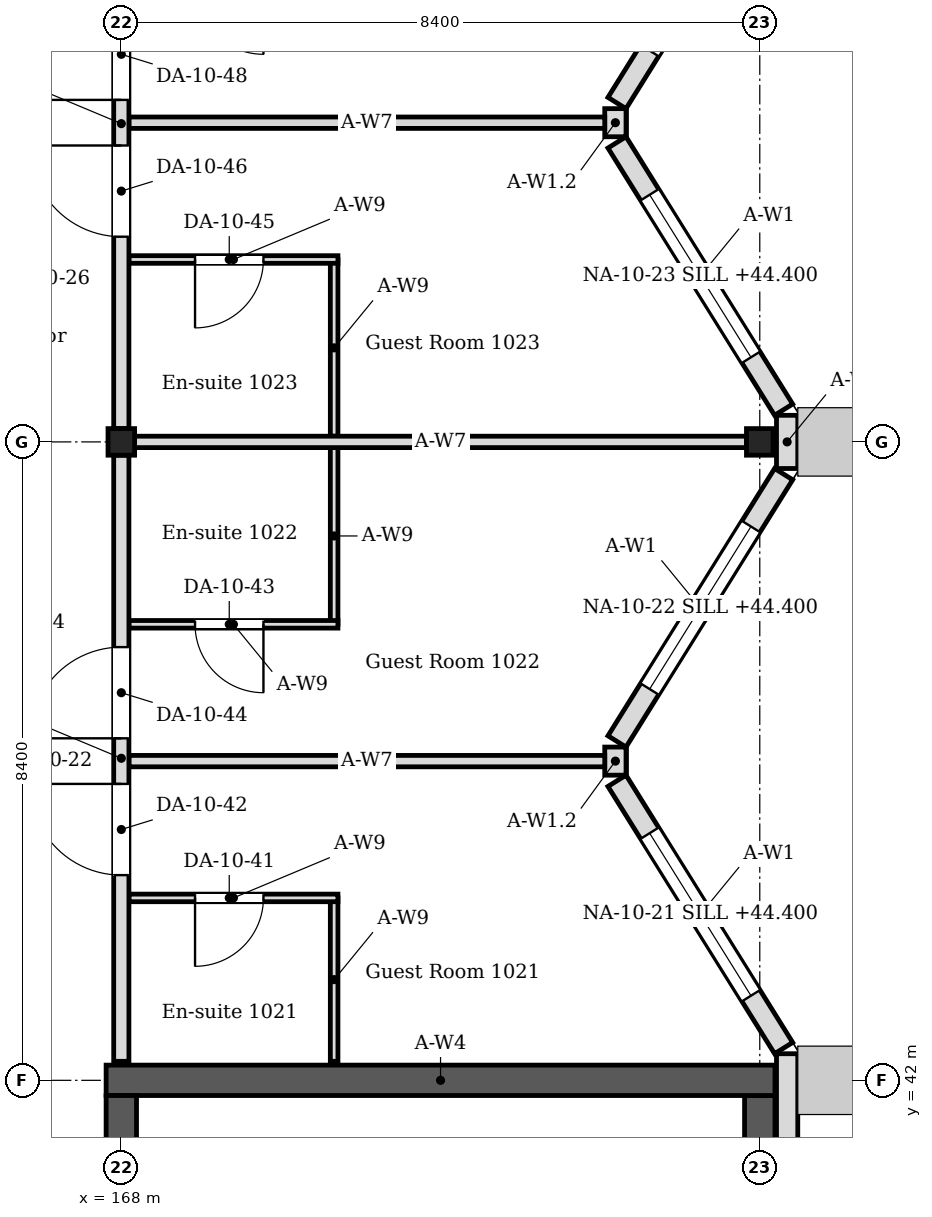
"""IFC4 building model, lengths in metres.
Left out: names, types, materials, properties, quantities, classifications, styles, units other than length and angle.
Written with IfcOpenShell. Run it as: python <this file> out.ifc"""

import sys

from ifc_helpers import new_model, si_unit, direction, frame, frame_2d, origin, origin_2d, place, context, subcontext, project, spatial, rectangle, i_section, extrude, element, fill, save


model = new_model("IFC4")
c1 = context("Model", 3, precision=1e-05, world=origin(), true_north=direction((0.0, 1.0)))
c2 = subcontext(c1, "Body", "Model", "MODEL_VIEW")
j1 = project(units=[si_unit("LENGTHUNIT", "METRE"), si_unit("PLANEANGLEUNIT", "RADIAN")], contexts=[c1])
p1 = place(None, origin())
s1 = spatial("IfcSite", under=j1, at=p1, CompositionType="ELEMENT")
p2 = place(p1, origin())
s2 = spatial("IfcBuilding", under=s1, at=p2, CompositionType="ELEMENT")
p3 = place(p2, frame((0.0, 0.0, 43.8)))
s3 = spatial("IfcBuildingStorey", under=s2, at=p3, CompositionType="ELEMENT", Elevation=43.8)
for number, where, z_axis, x_axis in (
    (1, (168.0, 50.4, 0.0), (0.0, 0.0, 1.0), (1.0, 0.0, 0.0)),
    (2, (176.4, 50.4, 0.0), (0.0, 0.0, 1.0), (1.0, 0.0, 0.0)),
):
    element("IfcColumn", number, at=place(p3, frame(where, z_axis=z_axis, x_axis=x_axis)), inside=s3, PredefinedType="COLUMN", context=c2, shape_type="SweptSolid", body=[
        extrude(i_section(OverallWidth=0.35, OverallDepth=0.35, WebThickness=0.012, FlangeThickness=0.019, FilletRadius=0.013, at=origin_2d()), origin(), (0.0, 0.0, 1.0), 4.2),
    ])
p4 = place(p3, frame((167.8, 42.0, 0.0), z_axis=(0.0, 0.0, 1.0), x_axis=(1.0, 0.0, 0.0)))
e3 = element("IfcWall", 3, at=p4, inside=s3, PredefinedType="SOLIDWALL", context=c2, shape_type="SweptSolid", body=[
    extrude(rectangle(XDim=8.8, YDim=0.4, at=frame_2d((4.4, 0.0))), origin(), (0.0, 0.0, 1.0), 4.05),
])
p5 = place(p3, frame((168.0, 25.4, 0.0), z_axis=(0.0, 0.0, 1.0), x_axis=(0.0, 1.0, 0.0)))
e4 = element("IfcWall", 4, at=p5, inside=s3, PredefinedType="SOLIDWALL", context=c2, shape_type="SweptSolid", body=[
    extrude(rectangle(XDim=16.4, YDim=0.4, at=frame_2d((8.2, 0.0))), origin(), (0.0, 0.0, 1.0), 4.05),
])
p6 = place(p5, frame((1.0, 0.0, 0.0)))
e5 = element("IfcOpeningElement", 5, at=p6, cuts=e4, PredefinedType="OPENING", context=c2, shape_type="SweptSolid", body=[
    extrude(rectangle(XDim=1.0, YDim=2.1, at=frame_2d((0.5, 1.05))), frame((0.0, 0.21, 0.0), z_axis=(0.0, -1.0, 0.0), x_axis=(1.0, 0.0, 0.0)), (0.0, 0.0, 1.0), 0.42),
])
p7 = place(p5, frame((14.4, 0.0, 0.0)))
e6 = element("IfcOpeningElement", 6, at=p7, cuts=e4, PredefinedType="OPENING", context=c2, shape_type="SweptSolid", body=[
    extrude(rectangle(XDim=1.4, YDim=2.1, at=frame_2d((0.7, 1.05))), frame((0.0, 0.21, 0.0), z_axis=(0.0, -1.0, 0.0), x_axis=(1.0, 0.0, 0.0)), (0.0, 0.0, 1.0), 0.42),
])
p8 = place(p3, frame((176.4, 25.4, 0.0), z_axis=(0.0, 0.0, 1.0), x_axis=(0.0, 1.0, 0.0)))
e7 = element("IfcWall", 7, at=p8, inside=s3, PredefinedType="SOLIDWALL", context=c2, shape_type="SweptSolid", body=[
    extrude(rectangle(XDim=16.4, YDim=0.4, at=frame_2d((8.2, 0.0))), origin(), (0.0, 0.0, 1.0), 4.05),
])
p9 = place(p3, frame((176.76, -0.22, 0.0), z_axis=(0.0, 0.0, 1.0), x_axis=(0.0, 1.0, 0.0)))
e8 = element("IfcWall", 8, at=p9, inside=s3, PredefinedType="SOLIDWALL", context=c2, shape_type="SweptSolid", body=[
    extrude(rectangle(XDim=42.57, YDim=0.28, at=frame_2d((21.285, 0.0))), origin(), (0.0, 0.0, 1.0), 4.05),
])
p10 = place(p9, frame((9.88, 0.0, 0.6)))
e9 = element("IfcOpeningElement", 9, at=p10, cuts=e8, PredefinedType="OPENING", context=c2, shape_type="SweptSolid", body=[
    extrude(rectangle(XDim=2.52, YDim=2.4, at=frame_2d((1.26, 1.2))), frame((0.0, 0.15, 0.0), z_axis=(0.0, -1.0, 0.0), x_axis=(1.0, 0.0, 0.0)), (0.0, 0.0, 1.0), 0.3),
])
p11 = place(p9, frame((14.08, 0.0, 0.6)))
e10 = element("IfcOpeningElement", 10, at=p11, cuts=e8, PredefinedType="OPENING", context=c2, shape_type="SweptSolid", body=[
    extrude(rectangle(XDim=2.52, YDim=2.4, at=frame_2d((1.26, 1.2))), frame((0.0, 0.15, 0.0), z_axis=(0.0, -1.0, 0.0), x_axis=(1.0, 0.0, 0.0)), (0.0, 0.0, 1.0), 0.3),
])
p12 = place(p9, frame((17.86, 0.0, 0.6)))
e11 = element("IfcOpeningElement", 11, at=p12, cuts=e8, PredefinedType="OPENING", context=c2, shape_type="SweptSolid", body=[
    extrude(rectangle(XDim=2.52, YDim=2.4, at=frame_2d((1.26, 1.2))), frame((0.0, 0.15, 0.0), z_axis=(0.0, -1.0, 0.0), x_axis=(1.0, 0.0, 0.0)), (0.0, 0.0, 1.0), 0.3),
])
p13 = place(p9, frame((22.06, 0.0, 0.45)))
e12 = element("IfcOpeningElement", 12, at=p13, cuts=e8, PredefinedType="OPENING", context=c2, shape_type="SweptSolid", body=[
    extrude(rectangle(XDim=2.52, YDim=2.1, at=frame_2d((1.26, 1.05))), frame((0.0, 0.15, 0.0), z_axis=(0.0, -1.0, 0.0), x_axis=(1.0, 0.0, 0.0)), (0.0, 0.0, 1.0), 0.3),
])
p14 = place(p3, frame((176.714, 42.424, 0.0), z_axis=(0.0, 0.0, 1.0), x_axis=(-0.529018946142, 0.848610013271, 0.0)))
e13 = element("IfcWall", 13, at=p14, inside=s3, PredefinedType="SOLIDWALL", context=c2, shape_type="SweptSolid", body=[
    extrude(rectangle(XDim=4.144, YDim=0.28, at=frame_2d((2.072, 0.0))), origin(), (0.0, 0.0, 1.0), 4.05),
])
p15 = place(p14, frame((0.812, 0.0, 0.6)))
e14 = element("IfcOpeningElement", 14, at=p15, cuts=e13, PredefinedType="OPENING", context=c2, shape_type="SweptSolid", body=[
    extrude(rectangle(XDim=2.52, YDim=2.4, at=frame_2d((1.26, 1.2))), frame((0.0, 0.15, 0.0), z_axis=(0.0, -1.0, 0.0), x_axis=(1.0, 0.0, 0.0)), (0.0, 0.0, 1.0), 0.3),
])
p16 = place(p3, frame((174.521, 46.459, 0.0), z_axis=(0.0, 0.0, 1.0), x_axis=(0.529018946142, 0.848610013271, 0.0)))
e15 = element("IfcWall", 15, at=p16, inside=s3, PredefinedType="SOLIDWALL", context=c2, shape_type="SweptSolid", body=[
    extrude(rectangle(XDim=4.144, YDim=0.28, at=frame_2d((2.072, 0.0))), origin(), (0.0, 0.0, 1.0), 4.05),
])
p17 = place(p16, frame((0.812, 0.0, 0.6)))
e16 = element("IfcOpeningElement", 16, at=p17, cuts=e15, PredefinedType="OPENING", context=c2, shape_type="SweptSolid", body=[
    extrude(rectangle(XDim=2.52, YDim=2.4, at=frame_2d((1.26, 1.2))), frame((0.0, 0.15, 0.0), z_axis=(0.0, -1.0, 0.0), x_axis=(1.0, 0.0, 0.0)), (0.0, 0.0, 1.0), 0.3),
])
p18 = place(p3, frame((174.5, 46.015, 0.0), z_axis=(0.0, 0.0, 1.0), x_axis=(0.0, 1.0, 0.0)))
e17 = element("IfcWall", 17, at=p18, inside=s3, PredefinedType="SOLIDWALL", context=c2, shape_type="SweptSolid", body=[
    extrude(rectangle(XDim=0.37, YDim=0.28, at=frame_2d((0.185, 0.0))), origin(), (0.0, 0.0, 1.0), 3.604),
])
p19 = place(p3, frame((176.76, 50.05, 0.0), z_axis=(0.0, 0.0, 1.0), x_axis=(0.0, 1.0, 0.0)))
e18 = element("IfcWall", 18, at=p19, inside=s3, PredefinedType="SOLIDWALL", context=c2, shape_type="SweptSolid", body=[
    extrude(rectangle(XDim=0.7, YDim=0.28, at=frame_2d((0.35, 0.0))), origin(), (0.0, 0.0, 1.0), 4.05),
])
p20 = place(p3, frame((176.714, 50.824, 0.0), z_axis=(0.0, 0.0, 1.0), x_axis=(-0.529018946142, 0.848610013271, 0.0)))
e19 = element("IfcWall", 19, at=p20, inside=s3, PredefinedType="SOLIDWALL", context=c2, shape_type="SweptSolid", body=[
    extrude(rectangle(XDim=4.144, YDim=0.28, at=frame_2d((2.072, 0.0))), origin(), (0.0, 0.0, 1.0), 4.05),
])
p21 = place(p20, frame((0.812, 0.0, 0.6)))
e20 = element("IfcOpeningElement", 20, at=p21, cuts=e19, PredefinedType="OPENING", context=c2, shape_type="SweptSolid", body=[
    extrude(rectangle(XDim=2.52, YDim=2.4, at=frame_2d((1.26, 1.2))), frame((0.0, 0.15, 0.0), z_axis=(0.0, -1.0, 0.0), x_axis=(1.0, 0.0, 0.0)), (0.0, 0.0, 1.0), 0.3),
])
p22 = place(p3, frame((174.521, 54.859, 0.0), z_axis=(0.0, 0.0, 1.0), x_axis=(0.528992500338, 0.848626498871, 0.0)))
e21 = element("IfcWall", 21, at=p22, inside=s3, PredefinedType="SOLIDWALL", context=c2, shape_type="SweptSolid", body=[
    extrude(rectangle(XDim=4.145, YDim=0.28, at=frame_2d((2.072, 0.0))), origin(), (0.0, 0.0, 1.0), 4.05),
])
p23 = place(p22, frame((0.812, 0.0, 0.6)))
e22 = element("IfcOpeningElement", 22, at=p23, cuts=e21, PredefinedType="OPENING", context=c2, shape_type="SweptSolid", body=[
    extrude(rectangle(XDim=2.52, YDim=2.4, at=frame_2d((1.26, 1.2))), frame((0.0, 0.15, 0.0), z_axis=(0.0, -1.0, 0.0), x_axis=(1.0, 0.0, 0.0)), (0.0, 0.0, 1.0), 0.3),
])
p24 = place(p3, frame((174.5, 54.415, 0.0), z_axis=(0.0, 0.0, 1.0), x_axis=(0.0, 1.0, 0.0)))
e23 = element("IfcWall", 23, at=p24, inside=s3, PredefinedType="SOLIDWALL", context=c2, shape_type="SweptSolid", body=[
    extrude(rectangle(XDim=0.37, YDim=0.28, at=frame_2d((0.185, 0.0))), origin(), (0.0, 0.0, 1.0), 3.604),
])
p25 = place(p3, frame((170.8, 42.25, 0.0), z_axis=(0.0, 0.0, 1.0), x_axis=(0.0, 1.0, 0.0)))
e24 = element("IfcWall", 24, at=p25, inside=s3, PredefinedType="PARTITIONING", context=c2, shape_type="SweptSolid", body=[
    extrude(rectangle(XDim=2.15, YDim=0.1, at=frame_2d((1.075, 0.0))), origin(), (0.0, 0.0, 1.0), 4.05),
])
p26 = place(p3, frame((170.85, 44.4, 0.0), z_axis=(0.0, 0.0, 1.0), x_axis=(-1.0, 0.0, 0.0)))
e25 = element("IfcWall", 25, at=p26, inside=s3, PredefinedType="PARTITIONING", context=c2, shape_type="SweptSolid", body=[
    extrude(rectangle(XDim=2.75, YDim=0.1, at=frame_2d((1.375, 0.0))), origin(), (0.0, 0.0, 1.0), 4.05),
])
p27 = place(p26, frame((0.98, 0.0, 0.0)))
e26 = element("IfcOpeningElement", 26, at=p27, cuts=e25, PredefinedType="OPENING", context=c2, shape_type="SweptSolid", body=[
    extrude(rectangle(XDim=0.9, YDim=2.1, at=frame_2d((0.45, 1.05))), frame((0.0, 0.06, 0.0), z_axis=(0.0, -1.0, 0.0), x_axis=(1.0, 0.0, 0.0)), (0.0, 0.0, 1.0), 0.12),
])
p28 = place(p3, frame((170.8, 48.0, 0.0), z_axis=(0.0, 0.0, 1.0), x_axis=(0.0, 1.0, 0.0)))
e27 = element("IfcWall", 27, at=p28, inside=s3, PredefinedType="PARTITIONING", context=c2, shape_type="SweptSolid", body=[
    extrude(rectangle(XDim=2.325, YDim=0.1, at=frame_2d((1.163, 0.0))), origin(), (0.0, 0.0, 1.0), 4.05),
])
p29 = place(p3, frame((170.85, 48.0, 0.0), z_axis=(0.0, 0.0, 1.0), x_axis=(-1.0, 0.0, 0.0)))
e28 = element("IfcWall", 28, at=p29, inside=s3, PredefinedType="PARTITIONING", context=c2, shape_type="SweptSolid", body=[
    extrude(rectangle(XDim=2.75, YDim=0.1, at=frame_2d((1.375, 0.0))), origin(), (0.0, 0.0, 1.0), 4.05),
])
p30 = place(p29, frame((0.98, 0.0, 0.0)))
e29 = element("IfcOpeningElement", 29, at=p30, cuts=e28, PredefinedType="OPENING", context=c2, shape_type="SweptSolid", body=[
    extrude(rectangle(XDim=0.9, YDim=2.1, at=frame_2d((0.45, 1.05))), frame((0.0, 0.06, 0.0), z_axis=(0.0, -1.0, 0.0), x_axis=(1.0, 0.0, 0.0)), (0.0, 0.0, 1.0), 0.12),
])
p31 = place(p3, frame((170.8, 50.475, 0.0), z_axis=(0.0, 0.0, 1.0), x_axis=(0.0, 1.0, 0.0)))
e30 = element("IfcWall", 30, at=p31, inside=s3, PredefinedType="PARTITIONING", context=c2, shape_type="SweptSolid", body=[
    extrude(rectangle(XDim=2.325, YDim=0.1, at=frame_2d((1.163, 0.0))), origin(), (0.0, 0.0, 1.0), 4.05),
])
p32 = place(p3, frame((170.85, 52.8, 0.0), z_axis=(0.0, 0.0, 1.0), x_axis=(-1.0, 0.0, 0.0)))
e31 = element("IfcWall", 31, at=p32, inside=s3, PredefinedType="PARTITIONING", context=c2, shape_type="SweptSolid", body=[
    extrude(rectangle(XDim=2.75, YDim=0.1, at=frame_2d((1.375, 0.0))), origin(), (0.0, 0.0, 1.0), 4.05),
])
p33 = place(p32, frame((0.98, 0.0, 0.0)))
e32 = element("IfcOpeningElement", 32, at=p33, cuts=e31, PredefinedType="OPENING", context=c2, shape_type="SweptSolid", body=[
    extrude(rectangle(XDim=0.9, YDim=2.1, at=frame_2d((0.45, 1.05))), frame((0.0, 0.06, 0.0), z_axis=(0.0, -1.0, 0.0), x_axis=(1.0, 0.0, 0.0)), (0.0, 0.0, 1.0), 0.12),
])
p34 = place(p3, frame((168.175, 50.4, 0.0), z_axis=(0.0, 0.0, 1.0), x_axis=(1.0, 0.0, 0.0)))
e33 = element("IfcWall", 33, at=p34, inside=s3, PredefinedType="PARTITIONING", context=c2, shape_type="SweptSolid", body=[
    extrude(rectangle(XDim=8.05, YDim=0.15, at=frame_2d((4.025, 0.0))), origin(), (0.0, 0.0, 1.0), 3.604),
])
for number, where, z_axis, x_axis in (
    (34, (168.1, 46.2, 0.0), (0.0, 0.0, 1.0), (1.0, 0.0, 0.0)),
    (35, (168.1, 54.6, 0.0), (0.0, 0.0, 1.0), (1.0, 0.0, 0.0)),
):
    element("IfcWall", number, at=place(p3, frame(where, z_axis=z_axis, x_axis=x_axis)), inside=s3, PredefinedType="PARTITIONING", context=c2, shape_type="SweptSolid", body=[
        extrude(rectangle(XDim=6.26, YDim=0.15, at=frame_2d((3.13, 0.0))), origin(), (0.0, 0.0, 1.0), 3.604),
    ])
p35 = place(p3, frame((168.0, 42.25, 0.0), z_axis=(0.0, 0.0, 1.0), x_axis=(0.0, 1.0, 0.0)))
e36 = element("IfcWall", 36, at=p35, inside=s3, PredefinedType="PARTITIONING", context=c2, shape_type="SweptSolid", body=[
    extrude(rectangle(XDim=7.975, YDim=0.2, at=frame_2d((3.988, 0.0))), origin(), (0.0, 0.0, 1.0), 3.45),
])
p36 = place(p35, frame((2.45, 0.0, 0.0)))
e37 = element("IfcOpeningElement", 37, at=p36, cuts=e36, PredefinedType="OPENING", context=c2, shape_type="SweptSolid", body=[
    extrude(rectangle(XDim=1.2, YDim=2.1, at=frame_2d((0.6, 1.05))), frame((0.0, 0.11, 0.0), z_axis=(0.0, -1.0, 0.0), x_axis=(1.0, 0.0, 0.0)), (0.0, 0.0, 1.0), 0.22),
])
p37 = place(p35, frame((4.25, 0.0, 0.0)))
e38 = element("IfcOpeningElement", 38, at=p37, cuts=e36, PredefinedType="OPENING", context=c2, shape_type="SweptSolid", body=[
    extrude(rectangle(XDim=1.2, YDim=2.1, at=frame_2d((0.6, 1.05))), frame((0.0, 0.11, 0.0), z_axis=(0.0, -1.0, 0.0), x_axis=(1.0, 0.0, 0.0)), (0.0, 0.0, 1.0), 0.22),
])
p38 = place(p3, frame((168.0, 50.575, 0.0), z_axis=(0.0, 0.0, 1.0), x_axis=(0.0, 1.0, 0.0)))
e39 = element("IfcWall", 39, at=p38, inside=s3, PredefinedType="PARTITIONING", context=c2, shape_type="SweptSolid", body=[
    extrude(rectangle(XDim=8.025, YDim=0.2, at=frame_2d((4.013, 0.0))), origin(), (0.0, 0.0, 1.0), 3.45),
])
p39 = place(p38, frame((2.525, 0.0, 0.0)))
e40 = element("IfcOpeningElement", 40, at=p39, cuts=e39, PredefinedType="OPENING", context=c2, shape_type="SweptSolid", body=[
    extrude(rectangle(XDim=1.2, YDim=2.1, at=frame_2d((0.6, 1.05))), frame((0.0, 0.11, 0.0), z_axis=(0.0, -1.0, 0.0), x_axis=(1.0, 0.0, 0.0)), (0.0, 0.0, 1.0), 0.22),
])
p40 = place(p38, frame((4.325, 0.0, 0.0)))
e41 = element("IfcOpeningElement", 41, at=p40, cuts=e39, PredefinedType="OPENING", context=c2, shape_type="SweptSolid", body=[
    extrude(rectangle(XDim=1.2, YDim=2.1, at=frame_2d((0.6, 1.05))), frame((0.0, 0.11, 0.0), z_axis=(0.0, -1.0, 0.0), x_axis=(1.0, 0.0, 0.0)), (0.0, 0.0, 1.0), 0.22),
])
p41 = place(p15, origin())
e42 = element("IfcWindow", 42, at=p41, inside=s3, PartitioningType="SINGLE_PANEL", PredefinedType="WINDOW", context=c2, shape_type="SweptSolid", body=[
    extrude(rectangle(XDim=2.52, YDim=2.4, at=frame_2d((1.26, 1.2))), frame((0.0, 0.03, 0.0), z_axis=(0.0, -1.0, 0.0), x_axis=(1.0, 0.0, 0.0)), (0.0, 0.0, 1.0), 0.06),
])
fill(e14, e42)
p42 = place(p17, origin())
e43 = element("IfcWindow", 43, at=p42, inside=s3, PartitioningType="SINGLE_PANEL", PredefinedType="WINDOW", context=c2, shape_type="SweptSolid", body=[
    extrude(rectangle(XDim=2.52, YDim=2.4, at=frame_2d((1.26, 1.2))), frame((0.0, 0.03, 0.0), z_axis=(0.0, -1.0, 0.0), x_axis=(1.0, 0.0, 0.0)), (0.0, 0.0, 1.0), 0.06),
])
fill(e16, e43)
p43 = place(p21, origin())
e44 = element("IfcWindow", 44, at=p43, inside=s3, PartitioningType="SINGLE_PANEL", PredefinedType="WINDOW", context=c2, shape_type="SweptSolid", body=[
    extrude(rectangle(XDim=2.52, YDim=2.4, at=frame_2d((1.26, 1.2))), frame((0.0, 0.03, 0.0), z_axis=(0.0, -1.0, 0.0), x_axis=(1.0, 0.0, 0.0)), (0.0, 0.0, 1.0), 0.06),
])
fill(e20, e44)
p44 = place(p27, origin())
e45 = element("IfcDoor", 45, at=p44, inside=s3, OperationType="SINGLE_SWING_RIGHT", PredefinedType="DOOR", context=c2, shape_type="SweptSolid", body=[
    extrude(rectangle(XDim=0.9, YDim=2.1, at=frame_2d((0.45, 1.05))), frame((0.0, 0.025, 0.0), z_axis=(0.0, -1.0, 0.0), x_axis=(1.0, 0.0, 0.0)), (0.0, 0.0, 1.0), 0.05),
])
fill(e26, e45)
p45 = place(p36, origin())
e46 = element("IfcDoor", 46, at=p45, inside=s3, OperationType="SINGLE_SWING_RIGHT", PredefinedType="DOOR", context=c2, shape_type="SweptSolid", body=[
    extrude(rectangle(XDim=1.2, YDim=2.1, at=frame_2d((0.6, 1.05))), frame((0.0, 0.025, 0.0), z_axis=(0.0, -1.0, 0.0), x_axis=(1.0, 0.0, 0.0)), (0.0, 0.0, 1.0), 0.05),
])
fill(e37, e46)
p46 = place(p30, origin())
e47 = element("IfcDoor", 47, at=p46, inside=s3, OperationType="SINGLE_SWING_LEFT", PredefinedType="DOOR", context=c2, shape_type="SweptSolid", body=[
    extrude(rectangle(XDim=0.9, YDim=2.1, at=frame_2d((0.45, 1.05))), frame((0.0, 0.025, 0.0), z_axis=(0.0, -1.0, 0.0), x_axis=(1.0, 0.0, 0.0)), (0.0, 0.0, 1.0), 0.05),
])
fill(e29, e47)
p47 = place(p37, origin())
e48 = element("IfcDoor", 48, at=p47, inside=s3, OperationType="SINGLE_SWING_LEFT", PredefinedType="DOOR", context=c2, shape_type="SweptSolid", body=[
    extrude(rectangle(XDim=1.2, YDim=2.1, at=frame_2d((0.6, 1.05))), frame((0.0, 0.025, 0.0), z_axis=(0.0, -1.0, 0.0), x_axis=(1.0, 0.0, 0.0)), (0.0, 0.0, 1.0), 0.05),
])
fill(e38, e48)
p48 = place(p33, origin())
e49 = element("IfcDoor", 49, at=p48, inside=s3, OperationType="SINGLE_SWING_RIGHT", PredefinedType="DOOR", context=c2, shape_type="SweptSolid", body=[
    extrude(rectangle(XDim=0.9, YDim=2.1, at=frame_2d((0.45, 1.05))), frame((0.0, 0.025, 0.0), z_axis=(0.0, -1.0, 0.0), x_axis=(1.0, 0.0, 0.0)), (0.0, 0.0, 1.0), 0.05),
])
fill(e32, e49)
p49 = place(p39, origin())
e50 = element("IfcDoor", 50, at=p49, inside=s3, OperationType="SINGLE_SWING_RIGHT", PredefinedType="DOOR", context=c2, shape_type="SweptSolid", body=[
    extrude(rectangle(XDim=1.2, YDim=2.1, at=frame_2d((0.6, 1.05))), frame((0.0, 0.025, 0.0), z_axis=(0.0, -1.0, 0.0), x_axis=(1.0, 0.0, 0.0)), (0.0, 0.0, 1.0), 0.05),
])
fill(e40, e50)
p50 = place(p40, origin())
e51 = element("IfcDoor", 51, at=p50, inside=s3, OperationType="SINGLE_SWING_LEFT", PredefinedType="DOOR", context=c2, shape_type="SweptSolid", body=[
    extrude(rectangle(XDim=1.2, YDim=2.1, at=frame_2d((0.6, 1.05))), frame((0.0, 0.025, 0.0), z_axis=(0.0, -1.0, 0.0), x_axis=(1.0, 0.0, 0.0)), (0.0, 0.0, 1.0), 0.05),
])
fill(e41, e51)
save(model, sys.argv[1])
